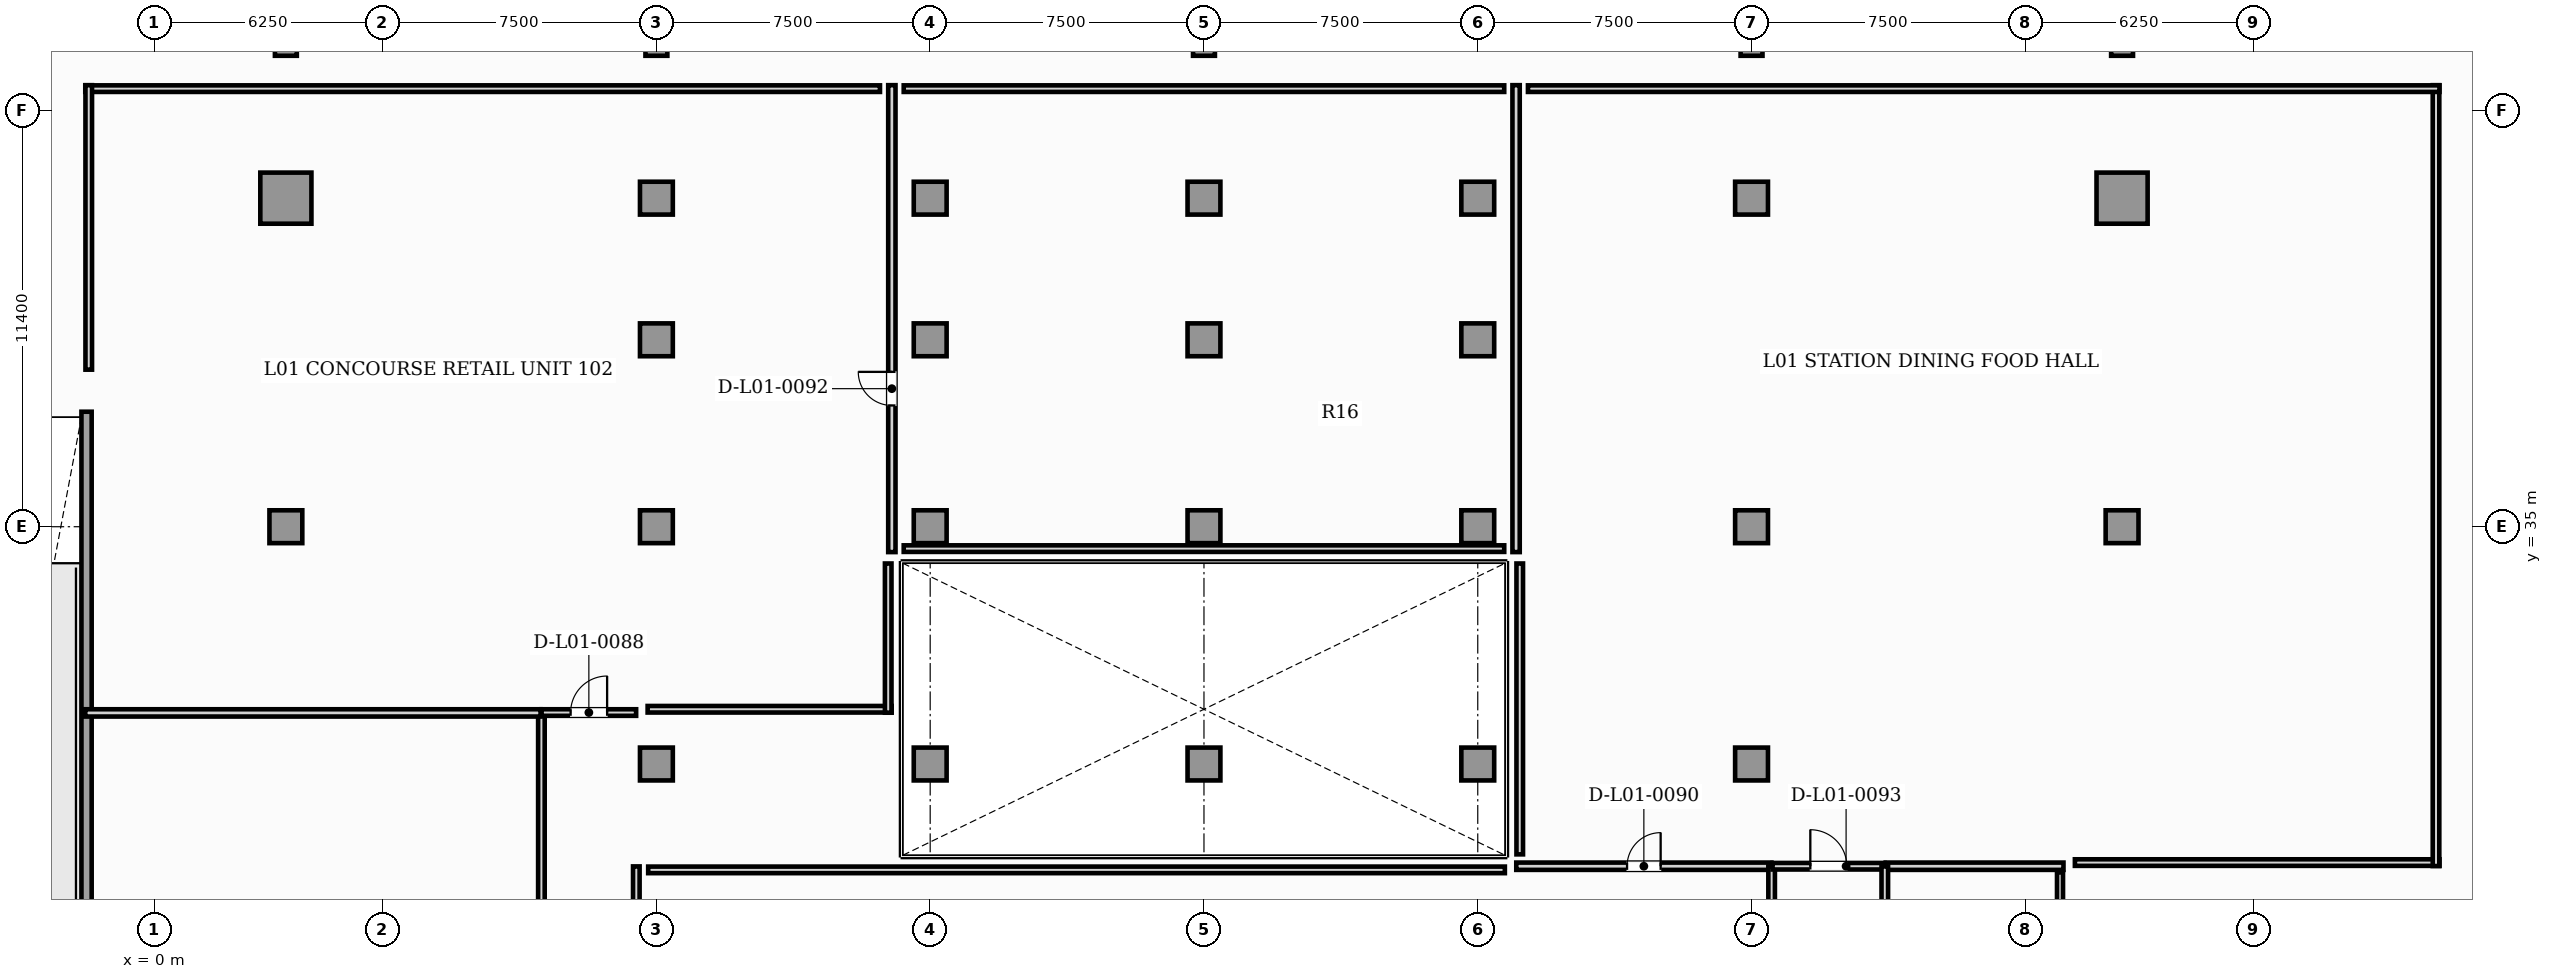
"""IFC4 building model, lengths in metres.
Left out: names, types, materials, properties, quantities, classifications, styles, units other than length and angle.
Written with IfcOpenShell. Run it as: python <this file> out.ifc"""

import sys

from ifc_helpers import new_model, si_unit, direction, frame, frame_2d, origin, origin_2d, place, context, subcontext, project, spatial, rectangle, hollow_rectangle, extrude, element, fill, save


model = new_model("IFC4")
c1 = context("Model", 3, precision=1e-05, world=origin(), true_north=direction((0.0, 1.0)))
c2 = subcontext(c1, "Body", "Model", "MODEL_VIEW")
j1 = project(units=[si_unit("LENGTHUNIT", "METRE"), si_unit("PLANEANGLEUNIT", "RADIAN")], contexts=[c1])
p1 = place(None, origin())
s1 = spatial("IfcSite", under=j1, at=p1, CompositionType="ELEMENT")
p2 = place(p1, origin())
s2 = spatial("IfcBuilding", under=s1, at=p2, CompositionType="ELEMENT")
p3 = place(p2, frame((0.0, 0.0, 5.4)))
s3 = spatial("IfcBuildingStorey", under=s2, at=p3, CompositionType="ELEMENT", Elevation=5.4)
p4 = place(p3, frame((-1.86, 3.88, 0.0), z_axis=(0.0, 0.0, 1.0), x_axis=(0.0, 1.0, 0.0)))
e1 = element("IfcWall", 1, at=p4, inside=s3, PredefinedType="SHEAR", context=c2, shape_type="SweptSolid", body=[
    extrude(rectangle(XDim=34.27, YDim=0.28, at=frame_2d((17.135, 0.0))), origin(), (0.0, 0.0, 1.0), 4.5),
])
for number, where, z_axis, x_axis in (
    (2, (53.9, 44.0, 0.0), (0.0, 0.0, 1.0), (1.0, 0.0, 0.0)),
    (3, (3.6, 44.0, 0.0), (0.0, 0.0, 1.0), (1.0, 0.0, 0.0)),
):
    element("IfcColumn", number, at=place(p3, frame(where, z_axis=z_axis, x_axis=x_axis)), inside=s3, PredefinedType="USERDEFINED", context=c2, shape_type="SweptSolid", body=[
        extrude(hollow_rectangle(XDim=1.4, YDim=1.4, WallThickness=0.08, at=origin_2d()), origin(), (0.0, 0.0, 1.0), 4.8),
    ])
for number, where, z_axis, x_axis in (
    (4, (3.6, 35.0, 0.0), (0.0, 0.0, 1.0), (1.0, 0.0, 0.0)),
    (5, (13.75, 35.0, 0.0), (0.0, 0.0, 1.0), (1.0, 0.0, 0.0)),
    (6, (13.75, 44.0, 0.0), (0.0, 0.0, 1.0), (1.0, 0.0, 0.0)),
    (7, (28.75, 35.0, 0.0), (0.0, 0.0, 1.0), (1.0, 0.0, 0.0)),
    (8, (28.75, 44.0, 0.0), (0.0, 0.0, 1.0), (1.0, 0.0, 0.0)),
    (9, (43.75, 35.0, 0.0), (0.0, 0.0, 1.0), (1.0, 0.0, 0.0)),
    (10, (43.75, 44.0, 0.0), (0.0, 0.0, 1.0), (1.0, 0.0, 0.0)),
    (11, (53.9, 35.0, 0.0), (0.0, 0.0, 1.0), (1.0, 0.0, 0.0)),
    (12, (13.75, 28.5, 0.0), (0.0, 0.0, 1.0), (1.0, 0.0, 0.0)),
    (13, (21.25, 28.5, 0.0), (0.0, 0.0, 1.0), (1.0, 0.0, 0.0)),
    (14, (28.75, 28.5, 0.0), (0.0, 0.0, 1.0), (1.0, 0.0, 0.0)),
    (15, (36.25, 28.5, 0.0), (0.0, 0.0, 1.0), (1.0, 0.0, 0.0)),
    (16, (43.75, 28.5, 0.0), (0.0, 0.0, 1.0), (1.0, 0.0, 0.0)),
    (17, (21.25, 35.0, 0.0), (0.0, 0.0, 1.0), (1.0, 0.0, 0.0)),
    (18, (36.25, 35.0, 0.0), (0.0, 0.0, 1.0), (1.0, 0.0, 0.0)),
    (19, (13.75, 40.12, 0.0), (0.0, 0.0, 1.0), (1.0, 0.0, 0.0)),
    (20, (21.25, 40.12, 0.0), (0.0, 0.0, 1.0), (1.0, 0.0, 0.0)),
    (21, (28.75, 40.12, 0.0), (0.0, 0.0, 1.0), (1.0, 0.0, 0.0)),
    (22, (36.25, 40.12, 0.0), (0.0, 0.0, 1.0), (1.0, 0.0, 0.0)),
    (23, (21.25, 44.0, 0.0), (0.0, 0.0, 1.0), (1.0, 0.0, 0.0)),
    (24, (36.25, 44.0, 0.0), (0.0, 0.0, 1.0), (1.0, 0.0, 0.0)),
):
    element("IfcColumn", number, at=place(p3, frame(where, z_axis=z_axis, x_axis=x_axis)), inside=s3, PredefinedType="COLUMN", context=c2, shape_type="SweptSolid", body=[
        extrude(rectangle(XDim=0.9, YDim=0.9, at=origin_2d()), origin(), (0.0, 0.0, 1.0), 4.8),
    ])
for number, where, z_axis, x_axis in (
    (25, (3.6, 48.2, 0.0), (0.0, 0.0, 1.0), (1.0, 0.0, 0.0)),
    (26, (13.75, 48.2, 0.0), (0.0, 0.0, 1.0), (1.0, 0.0, 0.0)),
    (27, (28.75, 48.2, 0.0), (0.0, 0.0, 1.0), (1.0, 0.0, 0.0)),
    (28, (43.75, 48.2, 0.0), (0.0, 0.0, 1.0), (1.0, 0.0, 0.0)),
    (29, (53.9, 48.2, 0.0), (0.0, 0.0, 1.0), (1.0, 0.0, 0.0)),
):
    element("IfcColumn", number, at=place(p3, frame(where, z_axis=z_axis, x_axis=x_axis)), inside=s3, PredefinedType="COLUMN", context=c2, shape_type="SweptSolid", body=[
        extrude(hollow_rectangle(XDim=0.6, YDim=0.6, WallThickness=0.04, at=origin_2d()), origin(), (0.0, 0.0, 1.0), 4.8),
    ])
p5 = place(p3, frame((13.2, 14.155, 0.0), z_axis=(0.0, 0.0, 1.0), x_axis=(0.0, 1.0, 0.0)))
e30 = element("IfcWall", 30, at=p5, inside=s3, PredefinedType="PARTITIONING", context=c2, shape_type="SweptSolid", body=[
    extrude(rectangle(XDim=11.54, YDim=0.18, at=frame_2d((5.77, 0.0))), origin(), (0.0, 0.0, 1.0), 4.5),
])
p6 = place(p3, frame((10.6, 14.155, 0.0), z_axis=(0.0, 0.0, 1.0), x_axis=(0.0, 1.0, 0.0)))
e31 = element("IfcWall", 31, at=p6, inside=s3, PredefinedType="PARTITIONING", context=c2, shape_type="SweptSolid", body=[
    extrude(rectangle(XDim=15.74, YDim=0.18, at=frame_2d((7.87, 0.0))), origin(), (0.0, 0.0, 1.0), 4.5),
])
p7 = place(p6, frame((7.37, 0.0, 0.0)))
e32 = element("IfcOpeningElement", 32, at=p7, cuts=e31, PredefinedType="OPENING", context=c2, shape_type="SweptSolid", body=[
    extrude(rectangle(XDim=1.0, YDim=2.15, at=frame_2d((0.5, 1.075))), frame((0.0, 0.1, 0.0), z_axis=(0.0, -1.0, 0.0), x_axis=(1.0, 0.0, 0.0)), (0.0, 0.0, 1.0), 0.2),
])
p8 = place(p3, frame((10.605, 29.91, 0.0), z_axis=(0.0, 0.0, 1.0), x_axis=(1.0, 0.0, 0.0)))
e33 = element("IfcWall", 33, at=p8, inside=s3, PredefinedType="PARTITIONING", context=c2, shape_type="SweptSolid", body=[
    extrude(rectangle(XDim=2.59, YDim=0.18, at=frame_2d((1.295, 0.0))), origin(), (0.0, 0.0, 1.0), 4.5),
])
p9 = place(p8, frame((0.795, 0.0, 0.0)))
e34 = element("IfcOpeningElement", 34, at=p9, cuts=e33, PredefinedType="OPENING", context=c2, shape_type="SweptSolid", body=[
    extrude(rectangle(XDim=1.0, YDim=2.15, at=frame_2d((0.5, 1.075))), frame((0.0, 0.1, 0.0), z_axis=(0.0, -1.0, 0.0), x_axis=(1.0, 0.0, 0.0)), (0.0, 0.0, 1.0), 0.2),
])
p10 = place(p3, frame((37.305, 25.7, 0.0), z_axis=(0.0, 0.0, 1.0), x_axis=(1.0, 0.0, 0.0)))
e35 = element("IfcWall", 35, at=p10, inside=s3, PredefinedType="PARTITIONING", context=c2, shape_type="SweptSolid", body=[
    extrude(rectangle(XDim=6.99, YDim=0.2, at=frame_2d((3.495, 0.0))), origin(), (0.0, 0.0, 1.0), 4.5),
])
p11 = place(p10, frame((3.035, 0.0, 0.0)))
e36 = element("IfcOpeningElement", 36, at=p11, cuts=e35, PredefinedType="OPENING", context=c2, shape_type="SweptSolid", body=[
    extrude(rectangle(XDim=0.92, YDim=2.1, at=frame_2d((0.46, 1.05))), frame((0.0, 0.11, 0.0), z_axis=(0.0, -1.0, 0.0), x_axis=(1.0, 0.0, 0.0)), (0.0, 0.0, 1.0), 0.22),
])
p12 = place(p3, frame((44.3, 14.155, 0.0), z_axis=(0.0, 0.0, 1.0), x_axis=(0.0, 1.0, 0.0)))
e37 = element("IfcWall", 37, at=p12, inside=s3, PredefinedType="PARTITIONING", context=c2, shape_type="SweptSolid", body=[
    extrude(rectangle(XDim=11.54, YDim=0.18, at=frame_2d((5.77, 0.0))), origin(), (0.0, 0.0, 1.0), 4.5),
])
p13 = place(p12, frame((5.27, 0.0, 0.0)))
e38 = element("IfcOpeningElement", 38, at=p13, cuts=e37, PredefinedType="OPENING", context=c2, shape_type="SweptSolid", body=[
    extrude(rectangle(XDim=1.0, YDim=2.15, at=frame_2d((0.5, 1.075))), frame((0.0, 0.1, 0.0), z_axis=(0.0, -1.0, 0.0), x_axis=(1.0, 0.0, 0.0)), (0.0, 0.0, 1.0), 0.2),
])
p14 = place(p3, frame((-1.895, 29.9, 0.0), z_axis=(0.0, 0.0, 1.0), x_axis=(1.0, 0.0, 0.0)))
e39 = element("IfcWall", 39, at=p14, inside=s3, PredefinedType="PARTITIONING", context=c2, shape_type="SweptSolid", body=[
    extrude(rectangle(XDim=12.472, YDim=0.2, at=frame_2d((6.236, 0.0))), origin(), (0.0, 0.0, 1.0), 4.5),
])
p15 = place(p3, frame((20.2, 34.305, 0.0), z_axis=(0.0, 0.0, 1.0), x_axis=(0.0, 1.0, 0.0)))
e40 = element("IfcWall", 40, at=p15, inside=s3, PredefinedType="PARTITIONING", context=c2, shape_type="SweptSolid", body=[
    extrude(rectangle(XDim=12.79, YDim=0.2, at=frame_2d((6.395, 0.0))), origin(), (0.0, 0.0, 1.0), 4.5),
])
p16 = place(p15, frame((4.017, 0.0, 0.0)))
e41 = element("IfcOpeningElement", 41, at=p16, cuts=e40, PredefinedType="OPENING", context=c2, shape_type="SweptSolid", body=[
    extrude(rectangle(XDim=0.92, YDim=2.1, at=frame_2d((0.46, 1.05))), frame((0.0, 0.11, 0.0), z_axis=(0.0, -1.0, 0.0), x_axis=(1.0, 0.0, 0.0)), (0.0, 0.0, 1.0), 0.22),
])
p17 = place(p3, frame((37.3, 34.305, 0.0), z_axis=(0.0, 0.0, 1.0), x_axis=(0.0, 1.0, 0.0)))
e42 = element("IfcWall", 42, at=p17, inside=s3, PredefinedType="PARTITIONING", context=c2, shape_type="SweptSolid", body=[
    extrude(rectangle(XDim=12.79, YDim=0.2, at=frame_2d((6.395, 0.0))), origin(), (0.0, 0.0, 1.0), 4.5),
])
p18 = place(p3, frame((44.325, 25.7, 0.0), z_axis=(0.0, 0.0, 1.0), x_axis=(1.0, 0.0, 0.0)))
e43 = element("IfcWall", 43, at=p18, inside=s3, PredefinedType="PARTITIONING", context=c2, shape_type="SweptSolid", body=[
    extrude(rectangle(XDim=3.07, YDim=0.18, at=frame_2d((1.535, 0.0))), origin(), (0.0, 0.0, 1.0), 4.5),
])
p19 = place(p18, frame((1.035, 0.0, 0.0)))
e44 = element("IfcOpeningElement", 44, at=p19, cuts=e43, PredefinedType="OPENING", context=c2, shape_type="SweptSolid", body=[
    extrude(rectangle(XDim=1.0, YDim=2.15, at=frame_2d((0.5, 1.075))), frame((0.0, 0.1, 0.0), z_axis=(0.0, -1.0, 0.0), x_axis=(1.0, 0.0, 0.0)), (0.0, 0.0, 1.0), 0.2),
])
p20 = place(p3, frame((47.425, 25.7, 0.0), z_axis=(0.0, 0.0, 1.0), x_axis=(1.0, 0.0, 0.0)))
e45 = element("IfcWall", 45, at=p20, inside=s3, PredefinedType="PARTITIONING", context=c2, shape_type="SweptSolid", body=[
    extrude(rectangle(XDim=4.87, YDim=0.2, at=frame_2d((2.435, 0.0))), origin(), (0.0, 0.0, 1.0), 4.5),
])
p21 = place(p3, frame((47.4, 21.775, 0.0), z_axis=(0.0, 0.0, 1.0), x_axis=(0.0, 1.0, 0.0)))
e46 = element("IfcWall", 46, at=p21, inside=s3, PredefinedType="PARTITIONING", context=c2, shape_type="SweptSolid", body=[
    extrude(rectangle(XDim=3.92, YDim=0.18, at=frame_2d((1.96, 0.0))), origin(), (0.0, 0.0, 1.0), 4.5),
])
p22 = place(p21, frame((1.435, 0.0, 0.0)))
e47 = element("IfcOpeningElement", 47, at=p22, cuts=e46, PredefinedType="OPENING", context=c2, shape_type="SweptSolid", body=[
    extrude(rectangle(XDim=1.05, YDim=2.15, at=frame_2d((0.525, 1.075))), frame((0.0, 0.1, 0.0), z_axis=(0.0, -1.0, 0.0), x_axis=(1.0, 0.0, 0.0)), (0.0, 0.0, 1.0), 0.2),
])
p23 = place(p3, frame((36.993, 25.6, 0.0), z_axis=(0.0, 0.0, 1.0), x_axis=(-1.0, 0.0, 0.0)))
e48 = element("IfcWall", 48, at=p23, inside=s3, PredefinedType="PARTITIONING", context=c2, shape_type="SweptSolid", body=[
    extrude(rectangle(XDim=23.468, YDim=0.18, at=frame_2d((11.734, 0.0))), origin(), (0.0, 0.0, 1.0), 4.5),
])
p24 = place(p3, frame((13.51, 30.0, 0.0), z_axis=(0.0, 0.0, 1.0), x_axis=(1.0, 0.0, 0.0)))
e49 = element("IfcWall", 49, at=p24, inside=s3, PredefinedType="PARTITIONING", context=c2, shape_type="SweptSolid", body=[
    extrude(rectangle(XDim=6.685, YDim=0.18, at=frame_2d((3.343, 0.0))), origin(), (0.0, 0.0, 1.0), 4.5),
])
p25 = place(p3, frame((20.1, 29.905, 0.0), z_axis=(0.0, 0.0, 1.0), x_axis=(0.0, 1.0, 0.0)))
e50 = element("IfcWall", 50, at=p25, inside=s3, PredefinedType="PARTITIONING", context=c2, shape_type="SweptSolid", body=[
    extrude(rectangle(XDim=4.088, YDim=0.18, at=frame_2d((2.044, 0.0))), origin(), (0.0, 0.0, 1.0), 4.5),
])
p26 = place(p3, frame((19.875, 47.0, 0.0), z_axis=(0.0, 0.0, 1.0), x_axis=(-1.0, 0.0, 0.0)))
e51 = element("IfcWall", 51, at=p26, inside=s3, PredefinedType="PARTITIONING", context=c2, shape_type="SweptSolid", body=[
    extrude(rectangle(XDim=21.77, YDim=0.18, at=frame_2d((10.885, 0.0))), origin(), (0.0, 0.0, 1.0), 4.5),
])
p27 = place(p3, frame((-1.8, 47.095, 0.0), z_axis=(0.0, 0.0, 1.0), x_axis=(0.0, -1.0, 0.0)))
e52 = element("IfcWall", 52, at=p27, inside=s3, PredefinedType="PARTITIONING", context=c2, shape_type="SweptSolid", body=[
    extrude(rectangle(XDim=7.793, YDim=0.18, at=frame_2d((3.896, 0.0))), origin(), (0.0, 0.0, 1.0), 4.5),
])
p28 = place(p3, frame((52.607, 25.8, 0.0), z_axis=(0.0, 0.0, 1.0), x_axis=(1.0, 0.0, 0.0)))
e53 = element("IfcWall", 53, at=p28, inside=s3, PredefinedType="PARTITIONING", context=c2, shape_type="SweptSolid", body=[
    extrude(rectangle(XDim=9.988, YDim=0.18, at=frame_2d((4.994, 0.0))), origin(), (0.0, 0.0, 1.0), 4.5),
])
p29 = place(p3, frame((62.5, 25.705, 0.0), z_axis=(0.0, 0.0, 1.0), x_axis=(0.0, 1.0, 0.0)))
e54 = element("IfcWall", 54, at=p29, inside=s3, PredefinedType="PARTITIONING", context=c2, shape_type="SweptSolid", body=[
    extrude(rectangle(XDim=21.39, YDim=0.18, at=frame_2d((10.695, 0.0))), origin(), (0.0, 0.0, 1.0), 4.5),
])
p30 = place(p3, frame((62.595, 47.0, 0.0), z_axis=(0.0, 0.0, 1.0), x_axis=(-1.0, 0.0, 0.0)))
e55 = element("IfcWall", 55, at=p30, inside=s3, PredefinedType="PARTITIONING", context=c2, shape_type="SweptSolid", body=[
    extrude(rectangle(XDim=24.97, YDim=0.18, at=frame_2d((12.485, 0.0))), origin(), (0.0, 0.0, 1.0), 4.5),
])
p31 = place(p3, frame((37.4, 33.993, 0.0), z_axis=(0.0, 0.0, 1.0), x_axis=(0.0, -1.0, 0.0)))
e56 = element("IfcWall", 56, at=p31, inside=s3, PredefinedType="PARTITIONING", context=c2, shape_type="SweptSolid", body=[
    extrude(rectangle(XDim=7.968, YDim=0.18, at=frame_2d((3.984, 0.0))), origin(), (0.0, 0.0, 1.0), 4.5),
])
for number, where, z_axis, x_axis in (
    (57, (20.525, 34.4, 0.0), (0.0, 0.0, 1.0), (1.0, 0.0, 0.0)),
    (58, (36.975, 47.0, 0.0), (0.0, 0.0, 1.0), (-1.0, 0.0, 0.0)),
):
    element("IfcWall", number, at=place(p3, frame(where, z_axis=z_axis, x_axis=x_axis)), inside=s3, PredefinedType="PARTITIONING", context=c2, shape_type="SweptSolid", body=[
        extrude(rectangle(XDim=16.45, YDim=0.18, at=frame_2d((8.225, 0.0))), origin(), (0.0, 0.0, 1.0), 4.5),
    ])
p32 = place(p3, frame((52.2, 21.905, 0.0), z_axis=(0.0, 0.0, 1.0), x_axis=(0.0, 1.0, 0.0)))
e59 = element("IfcWall", 59, at=p32, inside=s3, PredefinedType="PLUMBINGWALL", context=c2, shape_type="SweptSolid", body=[
    extrude(rectangle(XDim=3.63, YDim=0.165, at=frame_2d((1.815, 0.0))), origin(), (0.0, 0.0, 1.0), 4.5),
])
p33 = place(p9, origin())
e60 = element("IfcDoor", 60, at=p33, inside=s3, OperationType="SINGLE_SWING_RIGHT", PredefinedType="DOOR", context=c2, shape_type="SweptSolid", body=[
    extrude(rectangle(XDim=1.0, YDim=2.15, at=frame_2d((0.5, 1.075))), frame((0.0, 0.025, 0.0), z_axis=(0.0, -1.0, 0.0), x_axis=(1.0, 0.0, 0.0)), (0.0, 0.0, 1.0), 0.05),
])
fill(e34, e60)
p34 = place(p11, origin())
e61 = element("IfcDoor", 61, at=p34, inside=s3, OperationType="SINGLE_SWING_RIGHT", PredefinedType="DOOR", context=c2, shape_type="SweptSolid", body=[
    extrude(rectangle(XDim=0.92, YDim=2.1, at=frame_2d((0.46, 1.05))), frame((0.0, 0.025, 0.0), z_axis=(0.0, -1.0, 0.0), x_axis=(1.0, 0.0, 0.0)), (0.0, 0.0, 1.0), 0.05),
])
fill(e36, e61)
p35 = place(p16, origin())
e62 = element("IfcDoor", 62, at=p35, inside=s3, OperationType="SINGLE_SWING_RIGHT", PredefinedType="DOOR", context=c2, shape_type="SweptSolid", body=[
    extrude(rectangle(XDim=0.92, YDim=2.1, at=frame_2d((0.46, 1.05))), frame((0.0, 0.025, 0.0), z_axis=(0.0, -1.0, 0.0), x_axis=(1.0, 0.0, 0.0)), (0.0, 0.0, 1.0), 0.05),
])
fill(e41, e62)
p36 = place(p19, origin())
e63 = element("IfcDoor", 63, at=p36, inside=s3, OperationType="SINGLE_SWING_LEFT", PredefinedType="DOOR", context=c2, shape_type="SweptSolid", body=[
    extrude(rectangle(XDim=1.0, YDim=2.15, at=frame_2d((0.5, 1.075))), frame((0.0, 0.025, 0.0), z_axis=(0.0, -1.0, 0.0), x_axis=(1.0, 0.0, 0.0)), (0.0, 0.0, 1.0), 0.05),
])
fill(e44, e63)
save(model, sys.argv[1])
